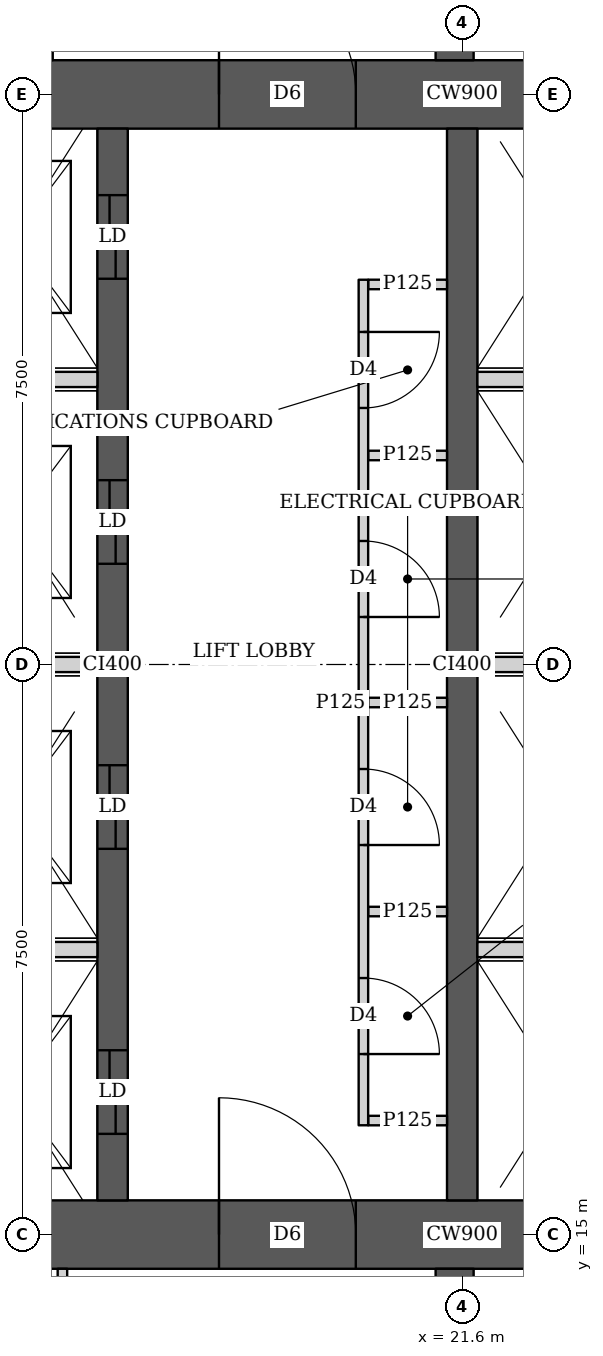
"""IFC4 building model, lengths in metres.
Left out: names, types, materials, properties, quantities, classifications, styles, units other than length and angle.
Written with IfcOpenShell. Run it as: python <this file> out.ifc"""

import sys

from ifc_helpers import new_model, si_unit, direction, frame, frame_2d, origin, place, context, subcontext, project, spatial, rectangle, extrude, element, fill, save


model = new_model("IFC4")
c1 = context("Model", 3, precision=1e-05, world=origin(), true_north=direction((0.0, 1.0)))
c2 = subcontext(c1, "Body", "Model", "MODEL_VIEW")
j1 = project(units=[si_unit("LENGTHUNIT", "METRE"), si_unit("PLANEANGLEUNIT", "RADIAN")], contexts=[c1])
p1 = place(None, origin())
s1 = spatial("IfcSite", under=j1, at=p1, CompositionType="ELEMENT")
p2 = place(p1, origin())
s2 = spatial("IfcBuilding", under=s1, at=p2, CompositionType="ELEMENT")
p3 = place(p2, frame((0.0, 0.0, 23.75)))
s3 = spatial("IfcBuildingStorey", under=s2, at=p3, CompositionType="ELEMENT", Elevation=23.75)
p4 = place(p3, frame((13.95, 15.0, 0.0), z_axis=(0.0, 0.0, 1.0), x_axis=(1.0, 0.0, 0.0)))
e1 = element("IfcWall", 1, at=p4, inside=s3, PredefinedType="SHEAR", context=c2, shape_type="SweptSolid", body=[
    extrude(rectangle(XDim=15.3, YDim=0.9, at=frame_2d((7.65, 0.0))), origin(), (0.0, 0.0, 1.0), 3.75),
])
p5 = place(p4, frame((4.45, 0.0, 0.0)))
e2 = element("IfcOpeningElement", 2, at=p5, cuts=e1, PredefinedType="OPENING", context=c2, shape_type="SweptSolid", body=[
    extrude(rectangle(XDim=1.8, YDim=2.1, at=frame_2d((0.9, 1.05))), frame((0.0, 0.46, 0.0), z_axis=(0.0, -1.0, 0.0), x_axis=(1.0, 0.0, 0.0)), (0.0, 0.0, 1.0), 0.92),
])
p6 = place(p4, frame((10.7, 0.0, 0.0)))
e3 = element("IfcOpeningElement", 3, at=p6, cuts=e1, PredefinedType="OPENING", context=c2, shape_type="SweptSolid", body=[
    extrude(rectangle(XDim=1.1, YDim=2.1, at=frame_2d((0.55, 1.05))), frame((0.0, 0.46, 0.0), z_axis=(0.0, -1.0, 0.0), x_axis=(1.0, 0.0, 0.0)), (0.0, 0.0, 1.0), 0.92),
])
p7 = place(p3, frame((13.95, 30.0, 0.0), z_axis=(0.0, 0.0, 1.0), x_axis=(1.0, 0.0, 0.0)))
e4 = element("IfcWall", 4, at=p7, inside=s3, PredefinedType="SHEAR", context=c2, shape_type="SweptSolid", body=[
    extrude(rectangle(XDim=15.3, YDim=0.9, at=frame_2d((7.65, 0.0))), origin(), (0.0, 0.0, 1.0), 3.75),
])
p8 = place(p7, frame((4.45, 0.0, 0.0)))
e5 = element("IfcOpeningElement", 5, at=p8, cuts=e4, PredefinedType="OPENING", context=c2, shape_type="SweptSolid", body=[
    extrude(rectangle(XDim=1.8, YDim=2.1, at=frame_2d((0.9, 1.05))), frame((0.0, 0.46, 0.0), z_axis=(0.0, -1.0, 0.0), x_axis=(1.0, 0.0, 0.0)), (0.0, 0.0, 1.0), 0.92),
])
p9 = place(p7, frame((10.7, 0.0, 0.0)))
e6 = element("IfcOpeningElement", 6, at=p9, cuts=e4, PredefinedType="OPENING", context=c2, shape_type="SweptSolid", body=[
    extrude(rectangle(XDim=1.1, YDim=2.1, at=frame_2d((0.55, 1.05))), frame((0.0, 0.46, 0.0), z_axis=(0.0, -1.0, 0.0), x_axis=(1.0, 0.0, 0.0)), (0.0, 0.0, 1.0), 0.92),
])
p10 = place(p3, frame((17.0, 15.45, 0.0), z_axis=(0.0, 0.0, 1.0), x_axis=(0.0, 1.0, 0.0)))
e7 = element("IfcWall", 7, at=p10, inside=s3, PredefinedType="SHEAR", context=c2, shape_type="SweptSolid", body=[
    extrude(rectangle(XDim=14.1, YDim=0.4, at=frame_2d((7.05, 0.0))), origin(), (0.0, 0.0, 1.0), 3.75),
])
p11 = place(p10, frame((0.875, 0.0, 0.0)))
e8 = element("IfcOpeningElement", 8, at=p11, cuts=e7, PredefinedType="OPENING", context=c2, shape_type="SweptSolid", body=[
    extrude(rectangle(XDim=1.1, YDim=2.1, at=frame_2d((0.55, 1.05))), frame((0.0, 0.21, 0.0), z_axis=(0.0, -1.0, 0.0), x_axis=(1.0, 0.0, 0.0)), (0.0, 0.0, 1.0), 0.42),
])
p12 = place(p10, frame((4.625, 0.0, 0.0)))
e9 = element("IfcOpeningElement", 9, at=p12, cuts=e7, PredefinedType="OPENING", context=c2, shape_type="SweptSolid", body=[
    extrude(rectangle(XDim=1.1, YDim=2.1, at=frame_2d((0.55, 1.05))), frame((0.0, 0.21, 0.0), z_axis=(0.0, -1.0, 0.0), x_axis=(1.0, 0.0, 0.0)), (0.0, 0.0, 1.0), 0.42),
])
p13 = place(p10, frame((8.375, 0.0, 0.0)))
e10 = element("IfcOpeningElement", 10, at=p13, cuts=e7, PredefinedType="OPENING", context=c2, shape_type="SweptSolid", body=[
    extrude(rectangle(XDim=1.1, YDim=2.1, at=frame_2d((0.55, 1.05))), frame((0.0, 0.21, 0.0), z_axis=(0.0, -1.0, 0.0), x_axis=(1.0, 0.0, 0.0)), (0.0, 0.0, 1.0), 0.42),
])
p14 = place(p10, frame((12.125, 0.0, 0.0)))
e11 = element("IfcOpeningElement", 11, at=p14, cuts=e7, PredefinedType="OPENING", context=c2, shape_type="SweptSolid", body=[
    extrude(rectangle(XDim=1.1, YDim=2.1, at=frame_2d((0.55, 1.05))), frame((0.0, 0.21, 0.0), z_axis=(0.0, -1.0, 0.0), x_axis=(1.0, 0.0, 0.0)), (0.0, 0.0, 1.0), 0.42),
])
p15 = place(p3, frame((21.6, 15.45, 0.0), z_axis=(0.0, 0.0, 1.0), x_axis=(0.0, 1.0, 0.0)))
e12 = element("IfcWall", 12, at=p15, inside=s3, PredefinedType="SHEAR", context=c2, shape_type="SweptSolid", body=[
    extrude(rectangle(XDim=14.1, YDim=0.4, at=frame_2d((7.05, 0.0))), origin(), (0.0, 0.0, 1.0), 3.75),
])
for number, where, z_axis, x_axis in (
    (13, (21.5, 10.35, 0.0), (0.0, 0.0, 1.0), (0.0, 1.0, 0.0)),
    (14, (21.5, 30.45, 0.0), (0.0, 0.0, 1.0), (0.0, 1.0, 0.0)),
):
    element("IfcWall", number, at=place(p3, frame(where, z_axis=z_axis, x_axis=x_axis)), inside=s3, PredefinedType="SHEAR", context=c2, shape_type="SweptSolid", body=[
        extrude(rectangle(XDim=4.2, YDim=0.5, at=frame_2d((2.1, 0.0))), origin(), (0.0, 0.0, 1.0), 3.75),
    ])
p16 = place(p3, frame((16.34, 10.413, 0.0), z_axis=(0.0, 0.0, 1.0), x_axis=(0.0, 1.0, 0.0)))
e15 = element("IfcWall", 15, at=p16, inside=s3, PredefinedType="PARTITIONING", context=c2, shape_type="SweptSolid", body=[
    extrude(rectangle(XDim=4.137, YDim=0.125, at=frame_2d((2.068, 0.0))), origin(), (0.0, 0.0, 1.0), 3.5),
])
p17 = place(p16, frame((1.512, 0.0, 0.0)))
e16 = element("IfcOpeningElement", 16, at=p17, cuts=e15, PredefinedType="OPENING", context=c2, shape_type="SweptSolid", body=[
    extrude(rectangle(XDim=1.0, YDim=2.1, at=frame_2d((0.5, 1.05))), frame((0.0, 0.073, 0.0), z_axis=(0.0, -1.0, 0.0), x_axis=(1.0, 0.0, 0.0)), (0.0, 0.0, 1.0), 0.145),
])
p18 = place(p3, frame((16.15, 30.45, 0.0), z_axis=(0.0, 0.0, 1.0), x_axis=(0.0, 1.0, 0.0)))
e17 = element("IfcWall", 17, at=p18, inside=s3, PredefinedType="PARTITIONING", context=c2, shape_type="SweptSolid", body=[
    extrude(rectangle(XDim=4.137, YDim=0.125, at=frame_2d((2.068, 0.0))), origin(), (0.0, 0.0, 1.0), 3.5),
])
p19 = place(p18, frame((1.625, 0.0, 0.0)))
e18 = element("IfcOpeningElement", 18, at=p19, cuts=e17, PredefinedType="OPENING", context=c2, shape_type="SweptSolid", body=[
    extrude(rectangle(XDim=1.0, YDim=2.1, at=frame_2d((0.5, 1.05))), frame((0.0, 0.073, 0.0), z_axis=(0.0, -1.0, 0.0), x_axis=(1.0, 0.0, 0.0)), (0.0, 0.0, 1.0), 0.145),
])
p20 = place(p3, frame((20.3, 16.438, 0.0), z_axis=(0.0, 0.0, 1.0), x_axis=(0.0, 1.0, 0.0)))
e19 = element("IfcWall", 19, at=p20, inside=s3, PredefinedType="PARTITIONING", context=c2, shape_type="SweptSolid", body=[
    extrude(rectangle(XDim=11.124, YDim=0.125, at=frame_2d((5.562, 0.0))), origin(), (0.0, 0.0, 1.0), 3.5),
])
p21 = place(p20, frame((0.937, 0.0, 0.0)))
e20 = element("IfcOpeningElement", 20, at=p21, cuts=e19, PredefinedType="OPENING", context=c2, shape_type="SweptSolid", body=[
    extrude(rectangle(XDim=1.0, YDim=2.1, at=frame_2d((0.5, 1.05))), frame((0.0, 0.073, 0.0), z_axis=(0.0, -1.0, 0.0), x_axis=(1.0, 0.0, 0.0)), (0.0, 0.0, 1.0), 0.145),
])
p22 = place(p20, frame((3.687, 0.0, 0.0)))
e21 = element("IfcOpeningElement", 21, at=p22, cuts=e19, PredefinedType="OPENING", context=c2, shape_type="SweptSolid", body=[
    extrude(rectangle(XDim=1.0, YDim=2.1, at=frame_2d((0.5, 1.05))), frame((0.0, 0.073, 0.0), z_axis=(0.0, -1.0, 0.0), x_axis=(1.0, 0.0, 0.0)), (0.0, 0.0, 1.0), 0.145),
])
p23 = place(p20, frame((6.687, 0.0, 0.0)))
e22 = element("IfcOpeningElement", 22, at=p23, cuts=e19, PredefinedType="OPENING", context=c2, shape_type="SweptSolid", body=[
    extrude(rectangle(XDim=1.0, YDim=2.1, at=frame_2d((0.5, 1.05))), frame((0.0, 0.073, 0.0), z_axis=(0.0, -1.0, 0.0), x_axis=(1.0, 0.0, 0.0)), (0.0, 0.0, 1.0), 0.145),
])
p24 = place(p20, frame((9.437, 0.0, 0.0)))
e23 = element("IfcOpeningElement", 23, at=p24, cuts=e19, PredefinedType="OPENING", context=c2, shape_type="SweptSolid", body=[
    extrude(rectangle(XDim=1.0, YDim=2.1, at=frame_2d((0.5, 1.05))), frame((0.0, 0.073, 0.0), z_axis=(0.0, -1.0, 0.0), x_axis=(1.0, 0.0, 0.0)), (0.0, 0.0, 1.0), 0.145),
])
for number, where, z_axis, x_axis in (
    (24, (20.363, 16.5, 0.0), (0.0, 0.0, 1.0), (1.0, 0.0, 0.0)),
    (25, (20.363, 27.5, 0.0), (0.0, 0.0, 1.0), (1.0, 0.0, 0.0)),
    (26, (20.363, 19.25, 0.0), (0.0, 0.0, 1.0), (1.0, 0.0, 0.0)),
    (27, (20.363, 22.0, 0.0), (0.0, 0.0, 1.0), (1.0, 0.0, 0.0)),
    (28, (20.363, 25.25, 0.0), (0.0, 0.0, 1.0), (1.0, 0.0, 0.0)),
):
    element("IfcWall", number, at=place(p3, frame(where, z_axis=z_axis, x_axis=x_axis)), inside=s3, PredefinedType="PARTITIONING", context=c2, shape_type="SweptSolid", body=[
        extrude(rectangle(XDim=1.037, YDim=0.125, at=frame_2d((0.519, 0.0))), origin(), (0.0, 0.0, 1.0), 3.5),
    ])
p25 = place(p3, frame((14.85, 18.75, 0.0), z_axis=(0.0, 0.0, 1.0), x_axis=(1.0, 0.0, 0.0)))
e29 = element("IfcWall", 29, at=p25, inside=s3, PredefinedType="SOLIDWALL", context=c2, shape_type="SweptSolid", body=[
    extrude(rectangle(XDim=1.95, YDim=0.2, at=frame_2d((0.975, 0.0))), origin(), (0.0, 0.0, 1.0), 3.5),
])
p26 = place(p3, frame((21.8, 18.75, 0.0), z_axis=(0.0, 0.0, 1.0), x_axis=(1.0, 0.0, 0.0)))
e30 = element("IfcWall", 30, at=p26, inside=s3, PredefinedType="SOLIDWALL", context=c2, shape_type="SweptSolid", body=[
    extrude(rectangle(XDim=2.2, YDim=0.2, at=frame_2d((1.1, 0.0))), origin(), (0.0, 0.0, 1.0), 3.5),
])
p27 = place(p3, frame((14.85, 22.5, 0.0), z_axis=(0.0, 0.0, 1.0), x_axis=(1.0, 0.0, 0.0)))
e31 = element("IfcWall", 31, at=p27, inside=s3, PredefinedType="SOLIDWALL", context=c2, shape_type="SweptSolid", body=[
    extrude(rectangle(XDim=1.95, YDim=0.2, at=frame_2d((0.975, 0.0))), origin(), (0.0, 0.0, 1.0), 3.5),
])
p28 = place(p3, frame((21.8, 22.5, 0.0), z_axis=(0.0, 0.0, 1.0), x_axis=(1.0, 0.0, 0.0)))
e32 = element("IfcWall", 32, at=p28, inside=s3, PredefinedType="SOLIDWALL", context=c2, shape_type="SweptSolid", body=[
    extrude(rectangle(XDim=2.2, YDim=0.2, at=frame_2d((1.1, 0.0))), origin(), (0.0, 0.0, 1.0), 3.5),
])
p29 = place(p3, frame((14.85, 26.25, 0.0), z_axis=(0.0, 0.0, 1.0), x_axis=(1.0, 0.0, 0.0)))
e33 = element("IfcWall", 33, at=p29, inside=s3, PredefinedType="SOLIDWALL", context=c2, shape_type="SweptSolid", body=[
    extrude(rectangle(XDim=1.95, YDim=0.2, at=frame_2d((0.975, 0.0))), origin(), (0.0, 0.0, 1.0), 3.5),
])
p30 = place(p3, frame((21.8, 26.25, 0.0), z_axis=(0.0, 0.0, 1.0), x_axis=(1.0, 0.0, 0.0)))
e34 = element("IfcWall", 34, at=p30, inside=s3, PredefinedType="SOLIDWALL", context=c2, shape_type="SweptSolid", body=[
    extrude(rectangle(XDim=2.2, YDim=0.2, at=frame_2d((1.1, 0.0))), origin(), (0.0, 0.0, 1.0), 3.5),
])
p31 = place(p21, origin())
e35 = element("IfcDoor", 35, at=p31, inside=s3, OperationType="SINGLE_SWING_RIGHT", PredefinedType="DOOR", context=c2, shape_type="SweptSolid", body=[
    extrude(rectangle(XDim=1.0, YDim=2.1, at=frame_2d((0.5, 1.05))), frame((0.0, 0.025, 0.0), z_axis=(0.0, -1.0, 0.0), x_axis=(1.0, 0.0, 0.0)), (0.0, 0.0, 1.0), 0.05),
])
fill(e20, e35)
p32 = place(p22, origin())
e36 = element("IfcDoor", 36, at=p32, inside=s3, OperationType="SINGLE_SWING_RIGHT", PredefinedType="DOOR", context=c2, shape_type="SweptSolid", body=[
    extrude(rectangle(XDim=1.0, YDim=2.1, at=frame_2d((0.5, 1.05))), frame((0.0, 0.025, 0.0), z_axis=(0.0, -1.0, 0.0), x_axis=(1.0, 0.0, 0.0)), (0.0, 0.0, 1.0), 0.05),
])
fill(e21, e36)
p33 = place(p23, origin())
e37 = element("IfcDoor", 37, at=p33, inside=s3, OperationType="SINGLE_SWING_RIGHT", PredefinedType="DOOR", context=c2, shape_type="SweptSolid", body=[
    extrude(rectangle(XDim=1.0, YDim=2.1, at=frame_2d((0.5, 1.05))), frame((0.0, 0.025, 0.0), z_axis=(0.0, -1.0, 0.0), x_axis=(1.0, 0.0, 0.0)), (0.0, 0.0, 1.0), 0.05),
])
fill(e22, e37)
p34 = place(p24, origin())
e38 = element("IfcDoor", 38, at=p34, inside=s3, OperationType="SINGLE_SWING_LEFT", PredefinedType="DOOR", context=c2, shape_type="SweptSolid", body=[
    extrude(rectangle(XDim=1.0, YDim=2.1, at=frame_2d((0.5, 1.05))), frame((0.0, 0.025, 0.0), z_axis=(0.0, -1.0, 0.0), x_axis=(1.0, 0.0, 0.0)), (0.0, 0.0, 1.0), 0.05),
])
fill(e23, e38)
p35 = place(p5, origin())
e39 = element("IfcDoor", 39, at=p35, inside=s3, OperationType="DOUBLE_DOOR_SINGLE_SWING", PredefinedType="DOOR", context=c2, shape_type="SweptSolid", body=[
    extrude(rectangle(XDim=1.8, YDim=2.1, at=frame_2d((0.9, 1.05))), frame((0.0, 0.025, 0.0), z_axis=(0.0, -1.0, 0.0), x_axis=(1.0, 0.0, 0.0)), (0.0, 0.0, 1.0), 0.05),
])
fill(e2, e39)
p36 = place(p8, origin())
e40 = element("IfcDoor", 40, at=p36, inside=s3, OperationType="DOUBLE_DOOR_SINGLE_SWING", PredefinedType="DOOR", context=c2, shape_type="SweptSolid", body=[
    extrude(rectangle(XDim=1.8, YDim=2.1, at=frame_2d((0.9, 1.05))), frame((0.0, 0.025, 0.0), z_axis=(0.0, -1.0, 0.0), x_axis=(1.0, 0.0, 0.0)), (0.0, 0.0, 1.0), 0.05),
])
fill(e5, e40)
p37 = place(p11, origin())
e41 = element("IfcDoor", 41, at=p37, inside=s3, OperationType="DOUBLE_DOOR_SLIDING", PredefinedType="DOOR", context=c2, shape_type="SweptSolid", body=[
    extrude(rectangle(XDim=1.1, YDim=2.1, at=frame_2d((0.55, 1.05))), frame((0.0, 0.025, 0.0), z_axis=(0.0, -1.0, 0.0), x_axis=(1.0, 0.0, 0.0)), (0.0, 0.0, 1.0), 0.05),
])
fill(e8, e41)
p38 = place(p12, origin())
e42 = element("IfcDoor", 42, at=p38, inside=s3, OperationType="DOUBLE_DOOR_SLIDING", PredefinedType="DOOR", context=c2, shape_type="SweptSolid", body=[
    extrude(rectangle(XDim=1.1, YDim=2.1, at=frame_2d((0.55, 1.05))), frame((0.0, 0.025, 0.0), z_axis=(0.0, -1.0, 0.0), x_axis=(1.0, 0.0, 0.0)), (0.0, 0.0, 1.0), 0.05),
])
fill(e9, e42)
p39 = place(p13, origin())
e43 = element("IfcDoor", 43, at=p39, inside=s3, OperationType="DOUBLE_DOOR_SLIDING", PredefinedType="DOOR", context=c2, shape_type="SweptSolid", body=[
    extrude(rectangle(XDim=1.1, YDim=2.1, at=frame_2d((0.55, 1.05))), frame((0.0, 0.025, 0.0), z_axis=(0.0, -1.0, 0.0), x_axis=(1.0, 0.0, 0.0)), (0.0, 0.0, 1.0), 0.05),
])
fill(e10, e43)
p40 = place(p14, origin())
e44 = element("IfcDoor", 44, at=p40, inside=s3, OperationType="DOUBLE_DOOR_SLIDING", PredefinedType="DOOR", context=c2, shape_type="SweptSolid", body=[
    extrude(rectangle(XDim=1.1, YDim=2.1, at=frame_2d((0.55, 1.05))), frame((0.0, 0.025, 0.0), z_axis=(0.0, -1.0, 0.0), x_axis=(1.0, 0.0, 0.0)), (0.0, 0.0, 1.0), 0.05),
])
fill(e11, e44)
save(model, sys.argv[1])
